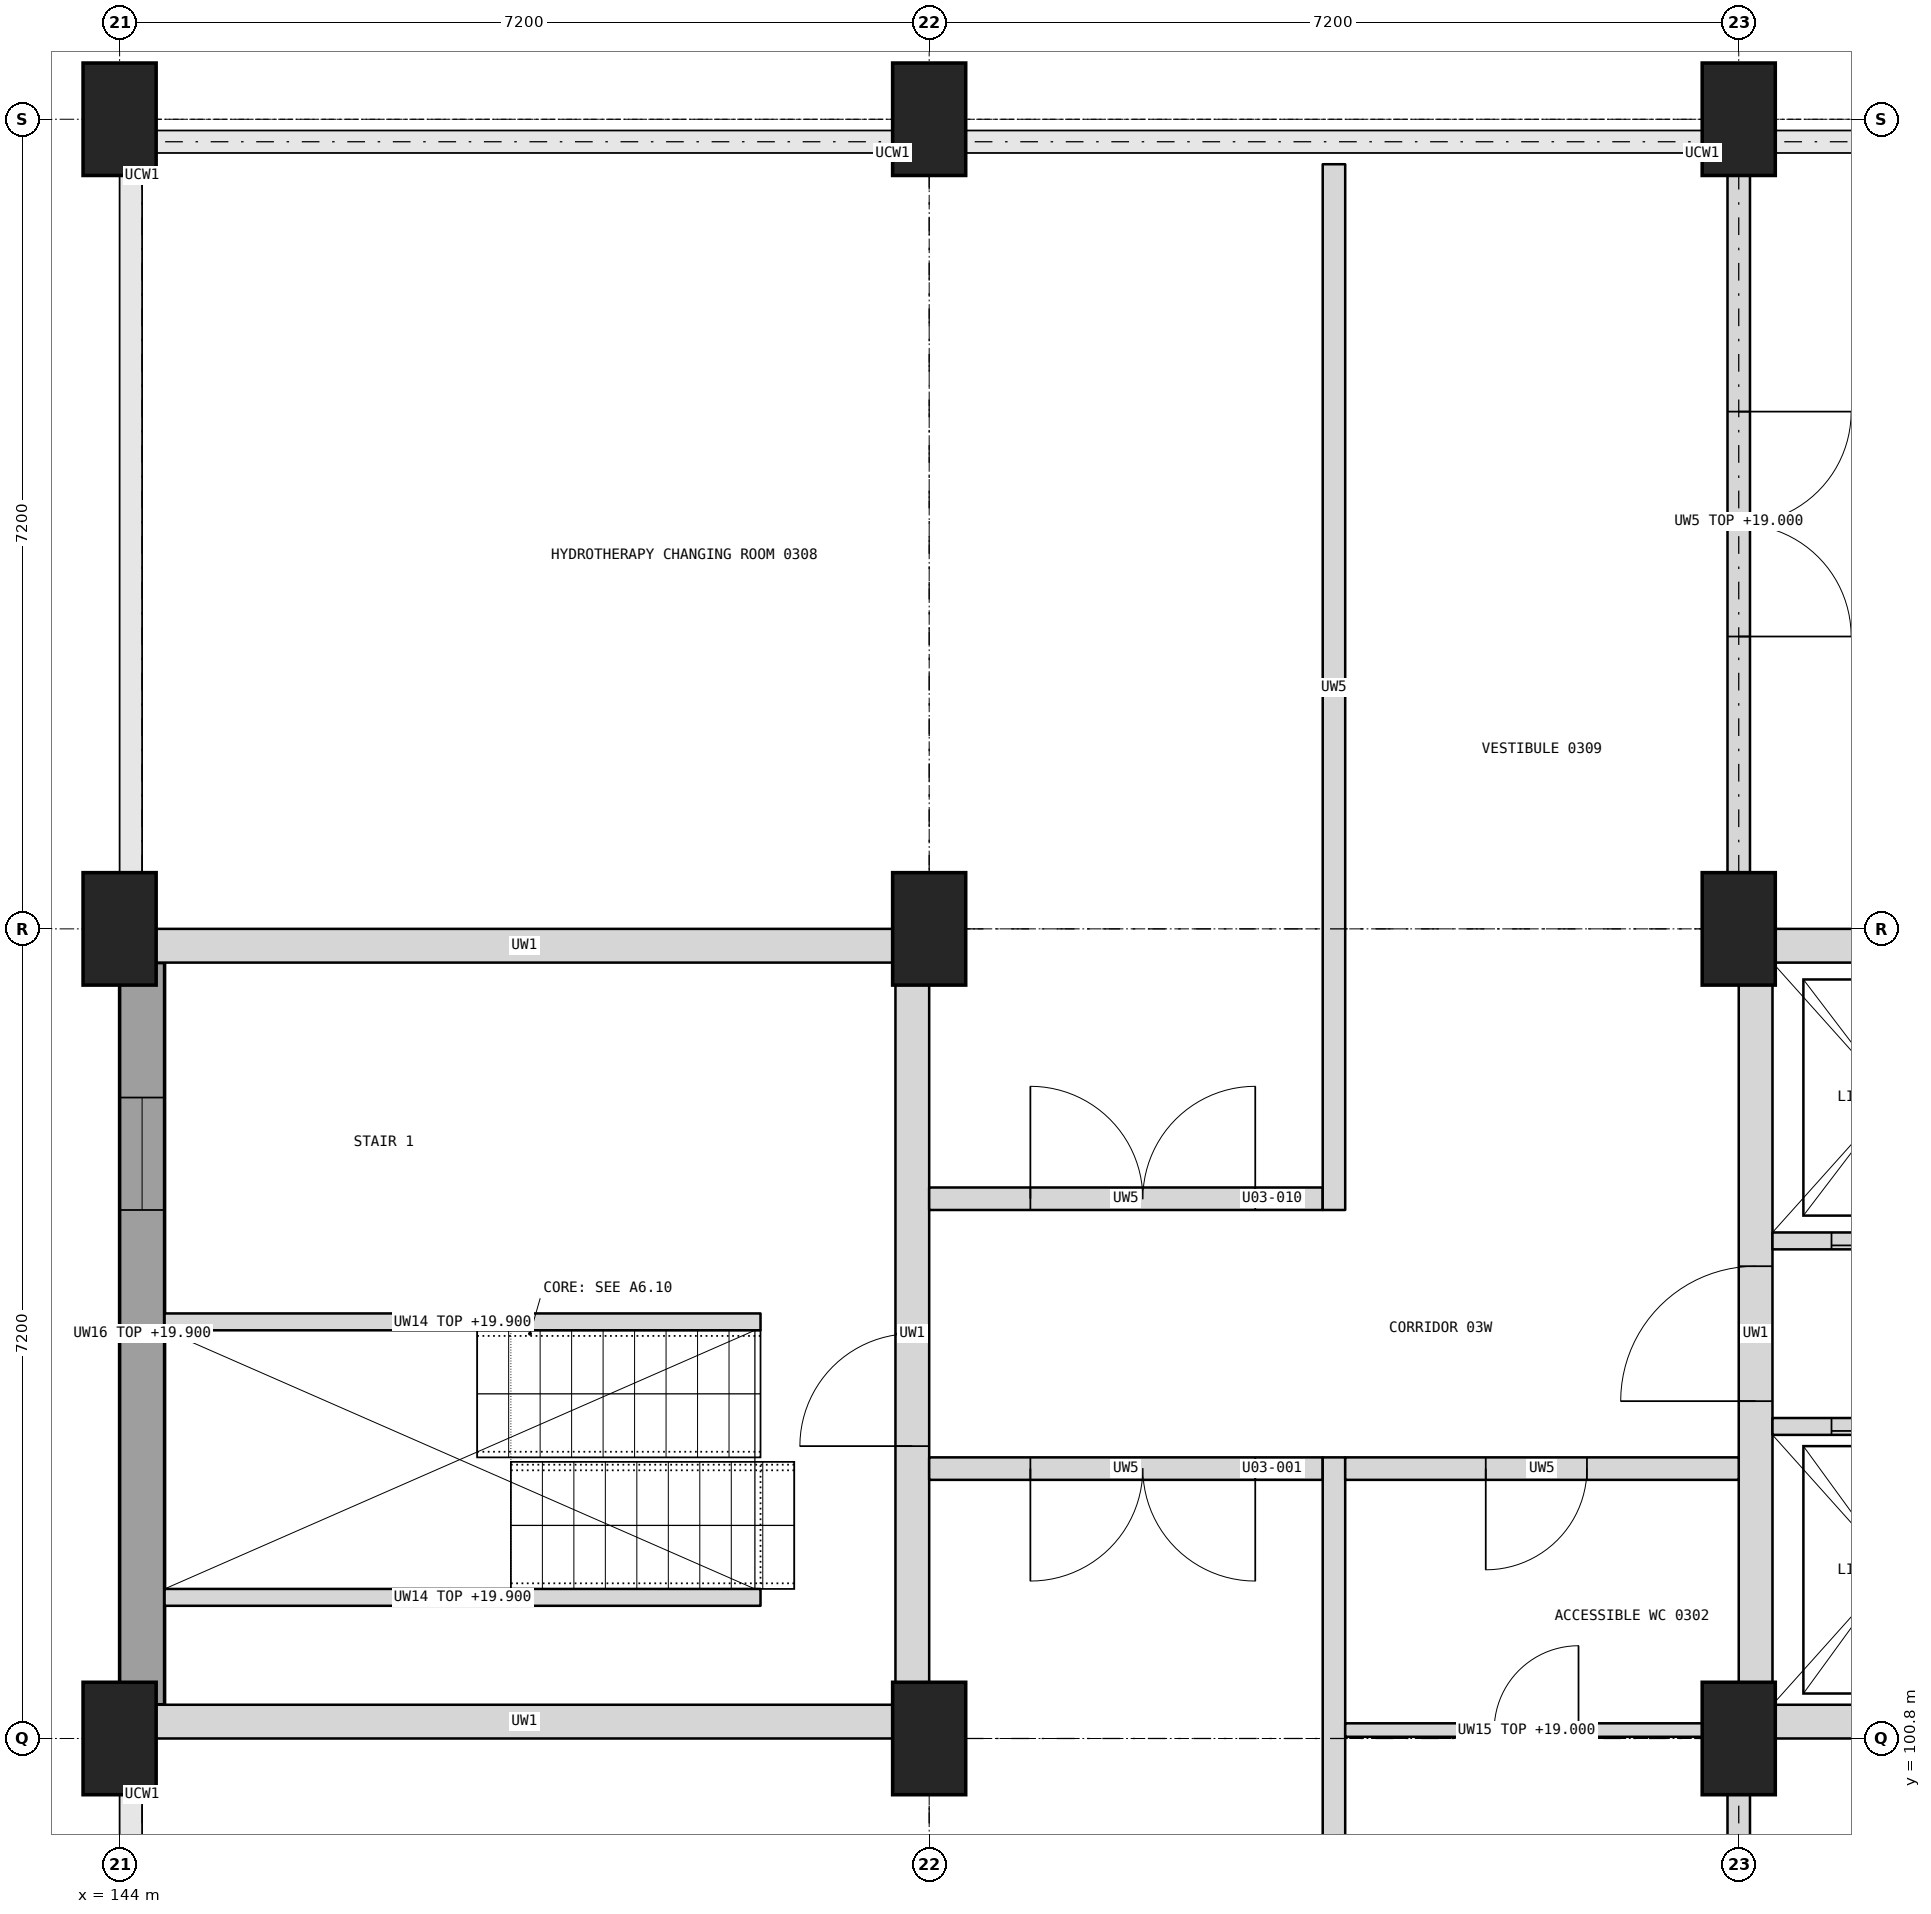
"""IFC4 building model, lengths in metres.
Left out: names, types, materials, properties, quantities, classifications, styles, units other than length and angle.
Written with IfcOpenShell. Run it as: python <this file> out.ifc"""

import sys

from ifc_helpers import new_model, si_unit, direction, frame, frame_2d, origin, origin_2d, place, context, subcontext, project, spatial, rectangle, extrude, element, fill, save


model = new_model("IFC4")
c1 = context("Model", 3, precision=1e-05, world=origin(), true_north=direction((0.0, 1.0)))
c2 = subcontext(c1, "Body", "Model", "MODEL_VIEW")
j1 = project(units=[si_unit("LENGTHUNIT", "METRE"), si_unit("PLANEANGLEUNIT", "RADIAN")], contexts=[c1])
p1 = place(None, origin())
s1 = spatial("IfcSite", under=j1, at=p1, CompositionType="ELEMENT")
p2 = place(p1, origin())
s2 = spatial("IfcBuilding", under=s1, at=p2, CompositionType="ELEMENT")
p3 = place(p2, frame((0.0, 0.0, 16.5)))
s3 = spatial("IfcBuildingStorey", under=s2, at=p3, CompositionType="ELEMENT", Elevation=16.5)
for number, where, z_axis, x_axis in (
    (1, (144.0, 100.8, 0.0), (0.0, 0.0, 1.0), (1.0, 0.0, 0.0)),
    (2, (144.0, 108.0, 0.0), (0.0, 0.0, 1.0), (1.0, 0.0, 0.0)),
    (3, (144.0, 115.2, 0.0), (0.0, 0.0, 1.0), (1.0, 0.0, 0.0)),
    (4, (151.2, 100.8, 0.0), (0.0, 0.0, 1.0), (1.0, 0.0, 0.0)),
    (5, (151.2, 108.0, 0.0), (0.0, 0.0, 1.0), (1.0, 0.0, 0.0)),
    (6, (151.2, 115.2, 0.0), (0.0, 0.0, 1.0), (1.0, 0.0, 0.0)),
    (7, (158.4, 100.8, 0.0), (0.0, 0.0, 1.0), (1.0, 0.0, 0.0)),
    (8, (158.4, 108.0, 0.0), (0.0, 0.0, 1.0), (1.0, 0.0, 0.0)),
    (9, (158.4, 115.2, 0.0), (0.0, 0.0, 1.0), (1.0, 0.0, 0.0)),
):
    element("IfcColumn", number, at=place(p3, frame(where, z_axis=z_axis, x_axis=x_axis)), inside=s3, PredefinedType="COLUMN", context=c2, shape_type="SweptSolid", body=[
        extrude(rectangle(XDim=0.65, YDim=1.0, at=origin_2d()), origin(), (0.0, 0.0, 1.0), 3.4),
    ])
for number, where, z_axis, x_axis in (
    (10, (158.4, 100.95, 0.0), (0.0, 0.0, 1.0), (1.0, 0.0, 0.0)),
    (11, (158.4, 107.85, 0.0), (0.0, 0.0, 1.0), (1.0, 0.0, 0.0)),
):
    element("IfcWall", number, at=place(p3, frame(where, z_axis=z_axis, x_axis=x_axis)), inside=s3, PredefinedType="SHEAR", context=c2, shape_type="SweptSolid", body=[
        extrude(rectangle(XDim=14.4, YDim=0.3, at=frame_2d((7.2, 0.0))), origin(), (0.0, 0.0, 1.0), 3.4),
    ])
p4 = place(p3, frame((158.55, 101.1, 0.0), z_axis=(0.0, 0.0, 1.0), x_axis=(0.0, 1.0, 0.0)))
e12 = element("IfcWall", 12, at=p4, inside=s3, PredefinedType="SHEAR", context=c2, shape_type="SweptSolid", body=[
    extrude(rectangle(XDim=6.6, YDim=0.3, at=frame_2d((3.3, 0.0))), origin(), (0.0, 0.0, 1.0), 3.4),
])
p5 = place(p4, frame((2.7, 0.0, 0.0)))
e13 = element("IfcOpeningElement", 13, at=p5, cuts=e12, PredefinedType="OPENING", context=c2, shape_type="SweptSolid", body=[
    extrude(rectangle(XDim=1.2, YDim=2.1, at=frame_2d((0.6, 1.05))), frame((0.0, 0.16, 0.0), z_axis=(0.0, -1.0, 0.0), x_axis=(1.0, 0.0, 0.0)), (0.0, 0.0, 1.0), 0.32),
])
p6 = place(p3, frame((158.7, 103.575, 0.0), z_axis=(0.0, 0.0, 1.0), x_axis=(1.0, 0.0, 0.0)))
e14 = element("IfcWall", 14, at=p6, inside=s3, PredefinedType="PARTITIONING", context=c2, shape_type="SweptSolid", body=[
    extrude(rectangle(XDim=6.75, YDim=0.15, at=frame_2d((3.375, 0.0))), origin(), (0.0, 0.0, 1.0), 3.4),
])
p7 = place(p6, frame((0.525, 0.0, 0.0)))
e15 = element("IfcOpeningElement", 15, at=p7, cuts=e14, PredefinedType="OPENING", context=c2, shape_type="SweptSolid", body=[
    extrude(rectangle(XDim=1.1, YDim=2.1, at=frame_2d((0.55, 1.05))), frame((0.0, 0.085, 0.0), z_axis=(0.0, -1.0, 0.0), x_axis=(1.0, 0.0, 0.0)), (0.0, 0.0, 1.0), 0.17),
])
p8 = place(p6, frame((2.825, 0.0, 0.0)))
e16 = element("IfcOpeningElement", 16, at=p8, cuts=e14, PredefinedType="OPENING", context=c2, shape_type="SweptSolid", body=[
    extrude(rectangle(XDim=1.1, YDim=2.1, at=frame_2d((0.55, 1.05))), frame((0.0, 0.085, 0.0), z_axis=(0.0, -1.0, 0.0), x_axis=(1.0, 0.0, 0.0)), (0.0, 0.0, 1.0), 0.17),
])
p9 = place(p6, frame((5.125, 0.0, 0.0)))
e17 = element("IfcOpeningElement", 17, at=p9, cuts=e14, PredefinedType="OPENING", context=c2, shape_type="SweptSolid", body=[
    extrude(rectangle(XDim=1.1, YDim=2.1, at=frame_2d((0.55, 1.05))), frame((0.0, 0.085, 0.0), z_axis=(0.0, -1.0, 0.0), x_axis=(1.0, 0.0, 0.0)), (0.0, 0.0, 1.0), 0.17),
])
p10 = place(p3, frame((158.7, 105.225, 0.0), z_axis=(0.0, 0.0, 1.0), x_axis=(1.0, 0.0, 0.0)))
e18 = element("IfcWall", 18, at=p10, inside=s3, PredefinedType="PARTITIONING", context=c2, shape_type="SweptSolid", body=[
    extrude(rectangle(XDim=6.75, YDim=0.15, at=frame_2d((3.375, 0.0))), origin(), (0.0, 0.0, 1.0), 3.4),
])
p11 = place(p10, frame((0.525, 0.0, 0.0)))
e19 = element("IfcOpeningElement", 19, at=p11, cuts=e18, PredefinedType="OPENING", context=c2, shape_type="SweptSolid", body=[
    extrude(rectangle(XDim=1.1, YDim=2.1, at=frame_2d((0.55, 1.05))), frame((0.0, 0.085, 0.0), z_axis=(0.0, -1.0, 0.0), x_axis=(1.0, 0.0, 0.0)), (0.0, 0.0, 1.0), 0.17),
])
p12 = place(p10, frame((2.975, 0.0, 0.0)))
e20 = element("IfcOpeningElement", 20, at=p12, cuts=e18, PredefinedType="OPENING", context=c2, shape_type="SweptSolid", body=[
    extrude(rectangle(XDim=0.8, YDim=2.1, at=frame_2d((0.4, 1.05))), frame((0.0, 0.085, 0.0), z_axis=(0.0, -1.0, 0.0), x_axis=(1.0, 0.0, 0.0)), (0.0, 0.0, 1.0), 0.17),
])
p13 = place(p10, frame((5.275, 0.0, 0.0)))
e21 = element("IfcOpeningElement", 21, at=p13, cuts=e18, PredefinedType="OPENING", context=c2, shape_type="SweptSolid", body=[
    extrude(rectangle(XDim=0.8, YDim=2.1, at=frame_2d((0.4, 1.05))), frame((0.0, 0.085, 0.0), z_axis=(0.0, -1.0, 0.0), x_axis=(1.0, 0.0, 0.0)), (0.0, 0.0, 1.0), 0.17),
])
for number, where, z_axis, x_axis in (
    (22, (144.0, 100.95, 0.0), (0.0, 0.0, 1.0), (1.0, 0.0, 0.0)),
    (23, (144.0, 107.85, 0.0), (0.0, 0.0, 1.0), (1.0, 0.0, 0.0)),
):
    element("IfcWall", number, at=place(p3, frame(where, z_axis=z_axis, x_axis=x_axis)), inside=s3, PredefinedType="SHEAR", context=c2, shape_type="SweptSolid", body=[
        extrude(rectangle(XDim=7.2, YDim=0.3, at=frame_2d((3.6, 0.0))), origin(), (0.0, 0.0, 1.0), 3.4),
    ])
p14 = place(p3, frame((151.05, 101.1, 0.0), z_axis=(0.0, 0.0, 1.0), x_axis=(0.0, 1.0, 0.0)))
e24 = element("IfcWall", 24, at=p14, inside=s3, PredefinedType="SHEAR", context=c2, shape_type="SweptSolid", body=[
    extrude(rectangle(XDim=6.6, YDim=0.3, at=frame_2d((3.3, 0.0))), origin(), (0.0, 0.0, 1.0), 3.4),
])
p15 = place(p14, frame((2.3, 0.0, 0.0)))
e25 = element("IfcOpeningElement", 25, at=p15, cuts=e24, PredefinedType="OPENING", context=c2, shape_type="SweptSolid", body=[
    extrude(rectangle(XDim=1.0, YDim=2.1, at=frame_2d((0.5, 1.05))), frame((0.0, 0.16, 0.0), z_axis=(0.0, -1.0, 0.0), x_axis=(1.0, 0.0, 0.0)), (0.0, 0.0, 1.0), 0.32),
])
p16 = place(p3, frame((144.2, 101.1, 0.0), z_axis=(0.0, 0.0, 1.0), x_axis=(0.0, 1.0, 0.0)))
e26 = element("IfcWall", 26, at=p16, inside=s3, PredefinedType="SHEAR", context=c2, shape_type="SweptSolid", body=[
    extrude(rectangle(XDim=6.6, YDim=0.4, at=frame_2d((3.3, 0.0))), origin(), (0.0, 0.0, 1.0), 3.4),
])
p17 = place(p16, frame((4.4, 0.0, 1.0)))
e27 = element("IfcOpeningElement", 27, at=p17, cuts=e26, PredefinedType="OPENING", context=c2, shape_type="SweptSolid", body=[
    extrude(rectangle(XDim=1.0, YDim=1.5, at=frame_2d((0.5, 0.75))), frame((0.0, 0.21, 0.0), z_axis=(0.0, -1.0, 0.0), x_axis=(1.0, 0.0, 0.0)), (0.0, 0.0, 1.0), 0.42),
])
for number, where, z_axis, x_axis in (
    (28, (144.4, 102.055, 0.0), (0.0, 0.0, 1.0), (1.0, 0.0, 0.0)),
    (29, (144.4, 104.505, 0.0), (0.0, 0.0, 1.0), (1.0, 0.0, 0.0)),
):
    element("IfcWall", number, at=place(p3, frame(where, z_axis=z_axis, x_axis=x_axis)), inside=s3, PredefinedType="SHEAR", context=c2, shape_type="SweptSolid", body=[
        extrude(rectangle(XDim=5.3, YDim=0.15, at=frame_2d((2.65, 0.0))), origin(), (0.0, 0.0, 1.0), 3.4),
    ])
p18 = place(p3, frame((151.2, 103.2, 0.0), z_axis=(0.0, 0.0, 1.0), x_axis=(1.0, 0.0, 0.0)))
e30 = element("IfcWall", 30, at=p18, inside=s3, PredefinedType="PARTITIONING", context=c2, shape_type="SweptSolid", body=[
    extrude(rectangle(XDim=3.5, YDim=0.2, at=frame_2d((1.75, 0.0))), origin(), (0.0, 0.0, 1.0), 3.1),
])
p19 = place(p18, frame((0.9, 0.0, 0.0)))
e31 = element("IfcOpeningElement", 31, at=p19, cuts=e30, PredefinedType="OPENING", context=c2, shape_type="SweptSolid", body=[
    extrude(rectangle(XDim=2.0, YDim=2.1, at=frame_2d((1.0, 1.05))), frame((0.0, 0.11, 0.0), z_axis=(0.0, -1.0, 0.0), x_axis=(1.0, 0.0, 0.0)), (0.0, 0.0, 1.0), 0.22),
])
p20 = place(p3, frame((154.8, 94.0, 0.0), z_axis=(0.0, 0.0, 1.0), x_axis=(0.0, 1.0, 0.0)))
e32 = element("IfcWall", 32, at=p20, inside=s3, PredefinedType="PARTITIONING", context=c2, shape_type="SweptSolid", body=[
    extrude(rectangle(XDim=9.3, YDim=0.2, at=frame_2d((4.65, 0.0))), origin(), (0.0, 0.0, 1.0), 3.1),
])
p21 = place(p3, frame((154.9, 100.875, 0.0), z_axis=(0.0, 0.0, 1.0), x_axis=(1.0, 0.0, 0.0)))
e33 = element("IfcWall", 33, at=p21, inside=s3, PredefinedType="PARTITIONING", context=c2, shape_type="SweptSolid", body=[
    extrude(rectangle(XDim=3.225, YDim=0.12, at=frame_2d((1.613, 0.0))), origin(), (0.0, 0.0, 1.0), 2.5),
])
p22 = place(p21, frame((1.325, 0.0, 0.0)))
e34 = element("IfcOpeningElement", 34, at=p22, cuts=e33, PredefinedType="OPENING", context=c2, shape_type="SweptSolid", body=[
    extrude(rectangle(XDim=0.75, YDim=2.1, at=frame_2d((0.375, 1.05))), frame((0.0, 0.07, 0.0), z_axis=(0.0, -1.0, 0.0), x_axis=(1.0, 0.0, 0.0)), (0.0, 0.0, 1.0), 0.14),
])
p23 = place(p3, frame((154.9, 103.2, 0.0), z_axis=(0.0, 0.0, 1.0), x_axis=(1.0, 0.0, 0.0)))
e35 = element("IfcWall", 35, at=p23, inside=s3, PredefinedType="PARTITIONING", context=c2, shape_type="SweptSolid", body=[
    extrude(rectangle(XDim=3.5, YDim=0.2, at=frame_2d((1.75, 0.0))), origin(), (0.0, 0.0, 1.0), 3.1),
])
p24 = place(p23, frame((1.25, 0.0, 0.0)))
e36 = element("IfcOpeningElement", 36, at=p24, cuts=e35, PredefinedType="OPENING", context=c2, shape_type="SweptSolid", body=[
    extrude(rectangle(XDim=0.9, YDim=2.1, at=frame_2d((0.45, 1.05))), frame((0.0, 0.11, 0.0), z_axis=(0.0, -1.0, 0.0), x_axis=(1.0, 0.0, 0.0)), (0.0, 0.0, 1.0), 0.22),
])
p25 = place(p3, frame((158.4, 94.0, 0.0), z_axis=(0.0, 0.0, 1.0), x_axis=(0.0, 1.0, 0.0)))
e37 = element("IfcWall", 37, at=p25, inside=s3, PredefinedType="PARTITIONING", context=c2, shape_type="SweptSolid", body=[
    extrude(rectangle(XDim=6.35, YDim=0.2, at=frame_2d((3.175, 0.0))), origin(), (0.0, 0.0, 1.0), 2.5),
])
p26 = place(p3, frame((151.2, 105.6, 0.0), z_axis=(0.0, 0.0, 1.0), x_axis=(1.0, 0.0, 0.0)))
e38 = element("IfcWall", 38, at=p26, inside=s3, PredefinedType="PARTITIONING", context=c2, shape_type="SweptSolid", body=[
    extrude(rectangle(XDim=3.5, YDim=0.2, at=frame_2d((1.75, 0.0))), origin(), (0.0, 0.0, 1.0), 3.1),
])
p27 = place(p26, frame((0.9, 0.0, 0.0)))
e39 = element("IfcOpeningElement", 39, at=p27, cuts=e38, PredefinedType="OPENING", context=c2, shape_type="SweptSolid", body=[
    extrude(rectangle(XDim=2.0, YDim=2.1, at=frame_2d((1.0, 1.05))), frame((0.0, 0.11, 0.0), z_axis=(0.0, -1.0, 0.0), x_axis=(1.0, 0.0, 0.0)), (0.0, 0.0, 1.0), 0.22),
])
p28 = place(p3, frame((154.8, 105.5, 0.0), z_axis=(0.0, 0.0, 1.0), x_axis=(0.0, 1.0, 0.0)))
e40 = element("IfcWall", 40, at=p28, inside=s3, PredefinedType="PARTITIONING", context=c2, shape_type="SweptSolid", body=[
    extrude(rectangle(XDim=9.3, YDim=0.2, at=frame_2d((4.65, 0.0))), origin(), (0.0, 0.0, 1.0), 3.1),
])
p29 = place(p3, frame((158.4, 108.45, 0.0), z_axis=(0.0, 0.0, 1.0), x_axis=(0.0, 1.0, 0.0)))
e41 = element("IfcWall", 41, at=p29, inside=s3, PredefinedType="PARTITIONING", context=c2, shape_type="SweptSolid", body=[
    extrude(rectangle(XDim=6.35, YDim=0.2, at=frame_2d((3.175, 0.0))), origin(), (0.0, 0.0, 1.0), 2.5),
])
p30 = place(p29, frame((2.15, 0.0, 0.0)))
e42 = element("IfcOpeningElement", 42, at=p30, cuts=e41, PredefinedType="OPENING", context=c2, shape_type="SweptSolid", body=[
    extrude(rectangle(XDim=2.0, YDim=2.1, at=frame_2d((1.0, 1.05))), frame((0.0, 0.11, 0.0), z_axis=(0.0, -1.0, 0.0), x_axis=(1.0, 0.0, 0.0)), (0.0, 0.0, 1.0), 0.22),
])
p31 = place(p17, origin())
e43 = element("IfcWindow", 43, at=p31, inside=s3, PartitioningType="SINGLE_PANEL", PredefinedType="WINDOW", context=c2, shape_type="SweptSolid", body=[
    extrude(rectangle(XDim=1.0, YDim=1.5, at=frame_2d((0.5, 0.75))), frame((0.0, 0.03, 0.0), z_axis=(0.0, -1.0, 0.0), x_axis=(1.0, 0.0, 0.0)), (0.0, 0.0, 1.0), 0.06),
])
fill(e27, e43)
p32 = place(p19, frame((2.0, 0.0, 0.0), z_axis=(0.0, 0.0, 1.0), x_axis=(-1.0, 0.0, 0.0)))
e44 = element("IfcDoor", 44, at=p32, inside=s3, OperationType="DOUBLE_DOOR_SINGLE_SWING", PredefinedType="DOOR", context=c2, shape_type="SweptSolid", body=[
    extrude(rectangle(XDim=2.0, YDim=2.1, at=frame_2d((1.0, 1.05))), frame((0.0, 0.025, 0.0), z_axis=(0.0, -1.0, 0.0), x_axis=(1.0, 0.0, 0.0)), (0.0, 0.0, 1.0), 0.05),
])
fill(e31, e44)
p33 = place(p22, origin())
e45 = element("IfcDoor", 45, at=p33, inside=s3, OperationType="SINGLE_SWING_RIGHT", PredefinedType="DOOR", context=c2, shape_type="SweptSolid", body=[
    extrude(rectangle(XDim=0.75, YDim=2.1, at=frame_2d((0.375, 1.05))), frame((0.0, 0.025, 0.0), z_axis=(0.0, -1.0, 0.0), x_axis=(1.0, 0.0, 0.0)), (0.0, 0.0, 1.0), 0.05),
])
fill(e34, e45)
p34 = place(p24, frame((0.9, 0.0, 0.0), z_axis=(0.0, 0.0, 1.0), x_axis=(-1.0, 0.0, 0.0)))
e46 = element("IfcDoor", 46, at=p34, inside=s3, OperationType="SINGLE_SWING_RIGHT", PredefinedType="DOOR", context=c2, shape_type="SweptSolid", body=[
    extrude(rectangle(XDim=0.9, YDim=2.1, at=frame_2d((0.45, 1.05))), frame((0.0, 0.025, 0.0), z_axis=(0.0, -1.0, 0.0), x_axis=(1.0, 0.0, 0.0)), (0.0, 0.0, 1.0), 0.05),
])
fill(e36, e46)
p35 = place(p27, origin())
e47 = element("IfcDoor", 47, at=p35, inside=s3, OperationType="DOUBLE_DOOR_SINGLE_SWING", PredefinedType="DOOR", context=c2, shape_type="SweptSolid", body=[
    extrude(rectangle(XDim=2.0, YDim=2.1, at=frame_2d((1.0, 1.05))), frame((0.0, 0.025, 0.0), z_axis=(0.0, -1.0, 0.0), x_axis=(1.0, 0.0, 0.0)), (0.0, 0.0, 1.0), 0.05),
])
fill(e39, e47)
p36 = place(p30, frame((2.0, 0.0, 0.0), z_axis=(0.0, 0.0, 1.0), x_axis=(-1.0, 0.0, 0.0)))
e48 = element("IfcDoor", 48, at=p36, inside=s3, OperationType="DOUBLE_DOOR_SINGLE_SWING", PredefinedType="DOOR", context=c2, shape_type="SweptSolid", body=[
    extrude(rectangle(XDim=2.0, YDim=2.1, at=frame_2d((1.0, 1.05))), frame((0.0, 0.025, 0.0), z_axis=(0.0, -1.0, 0.0), x_axis=(1.0, 0.0, 0.0)), (0.0, 0.0, 1.0), 0.05),
])
fill(e42, e48)
p37 = place(p7, origin())
e49 = element("IfcDoor", 49, at=p37, inside=s3, OperationType="DOUBLE_DOOR_SLIDING", PredefinedType="DOOR", context=c2, shape_type="SweptSolid", body=[
    extrude(rectangle(XDim=1.1, YDim=2.1, at=frame_2d((0.55, 1.05))), frame((0.0, 0.025, 0.0), z_axis=(0.0, -1.0, 0.0), x_axis=(1.0, 0.0, 0.0)), (0.0, 0.0, 1.0), 0.05),
])
fill(e15, e49)
p38 = place(p11, origin())
e50 = element("IfcDoor", 50, at=p38, inside=s3, OperationType="DOUBLE_DOOR_SLIDING", PredefinedType="DOOR", context=c2, shape_type="SweptSolid", body=[
    extrude(rectangle(XDim=1.1, YDim=2.1, at=frame_2d((0.55, 1.05))), frame((0.0, 0.025, 0.0), z_axis=(0.0, -1.0, 0.0), x_axis=(1.0, 0.0, 0.0)), (0.0, 0.0, 1.0), 0.05),
])
fill(e19, e50)
p39 = place(p5, origin())
e51 = element("IfcDoor", 51, at=p39, inside=s3, OperationType="SINGLE_SWING_LEFT", PredefinedType="DOOR", context=c2, shape_type="SweptSolid", body=[
    extrude(rectangle(XDim=1.2, YDim=2.1, at=frame_2d((0.6, 1.05))), frame((0.0, 0.025, 0.0), z_axis=(0.0, -1.0, 0.0), x_axis=(1.0, 0.0, 0.0)), (0.0, 0.0, 1.0), 0.05),
])
fill(e13, e51)
p40 = place(p15, origin())
e52 = element("IfcDoor", 52, at=p40, inside=s3, OperationType="SINGLE_SWING_LEFT", PredefinedType="DOOR", context=c2, shape_type="SweptSolid", body=[
    extrude(rectangle(XDim=1.0, YDim=2.1, at=frame_2d((0.5, 1.05))), frame((0.0, 0.025, 0.0), z_axis=(0.0, -1.0, 0.0), x_axis=(1.0, 0.0, 0.0)), (0.0, 0.0, 1.0), 0.05),
])
fill(e25, e52)
save(model, sys.argv[1])
